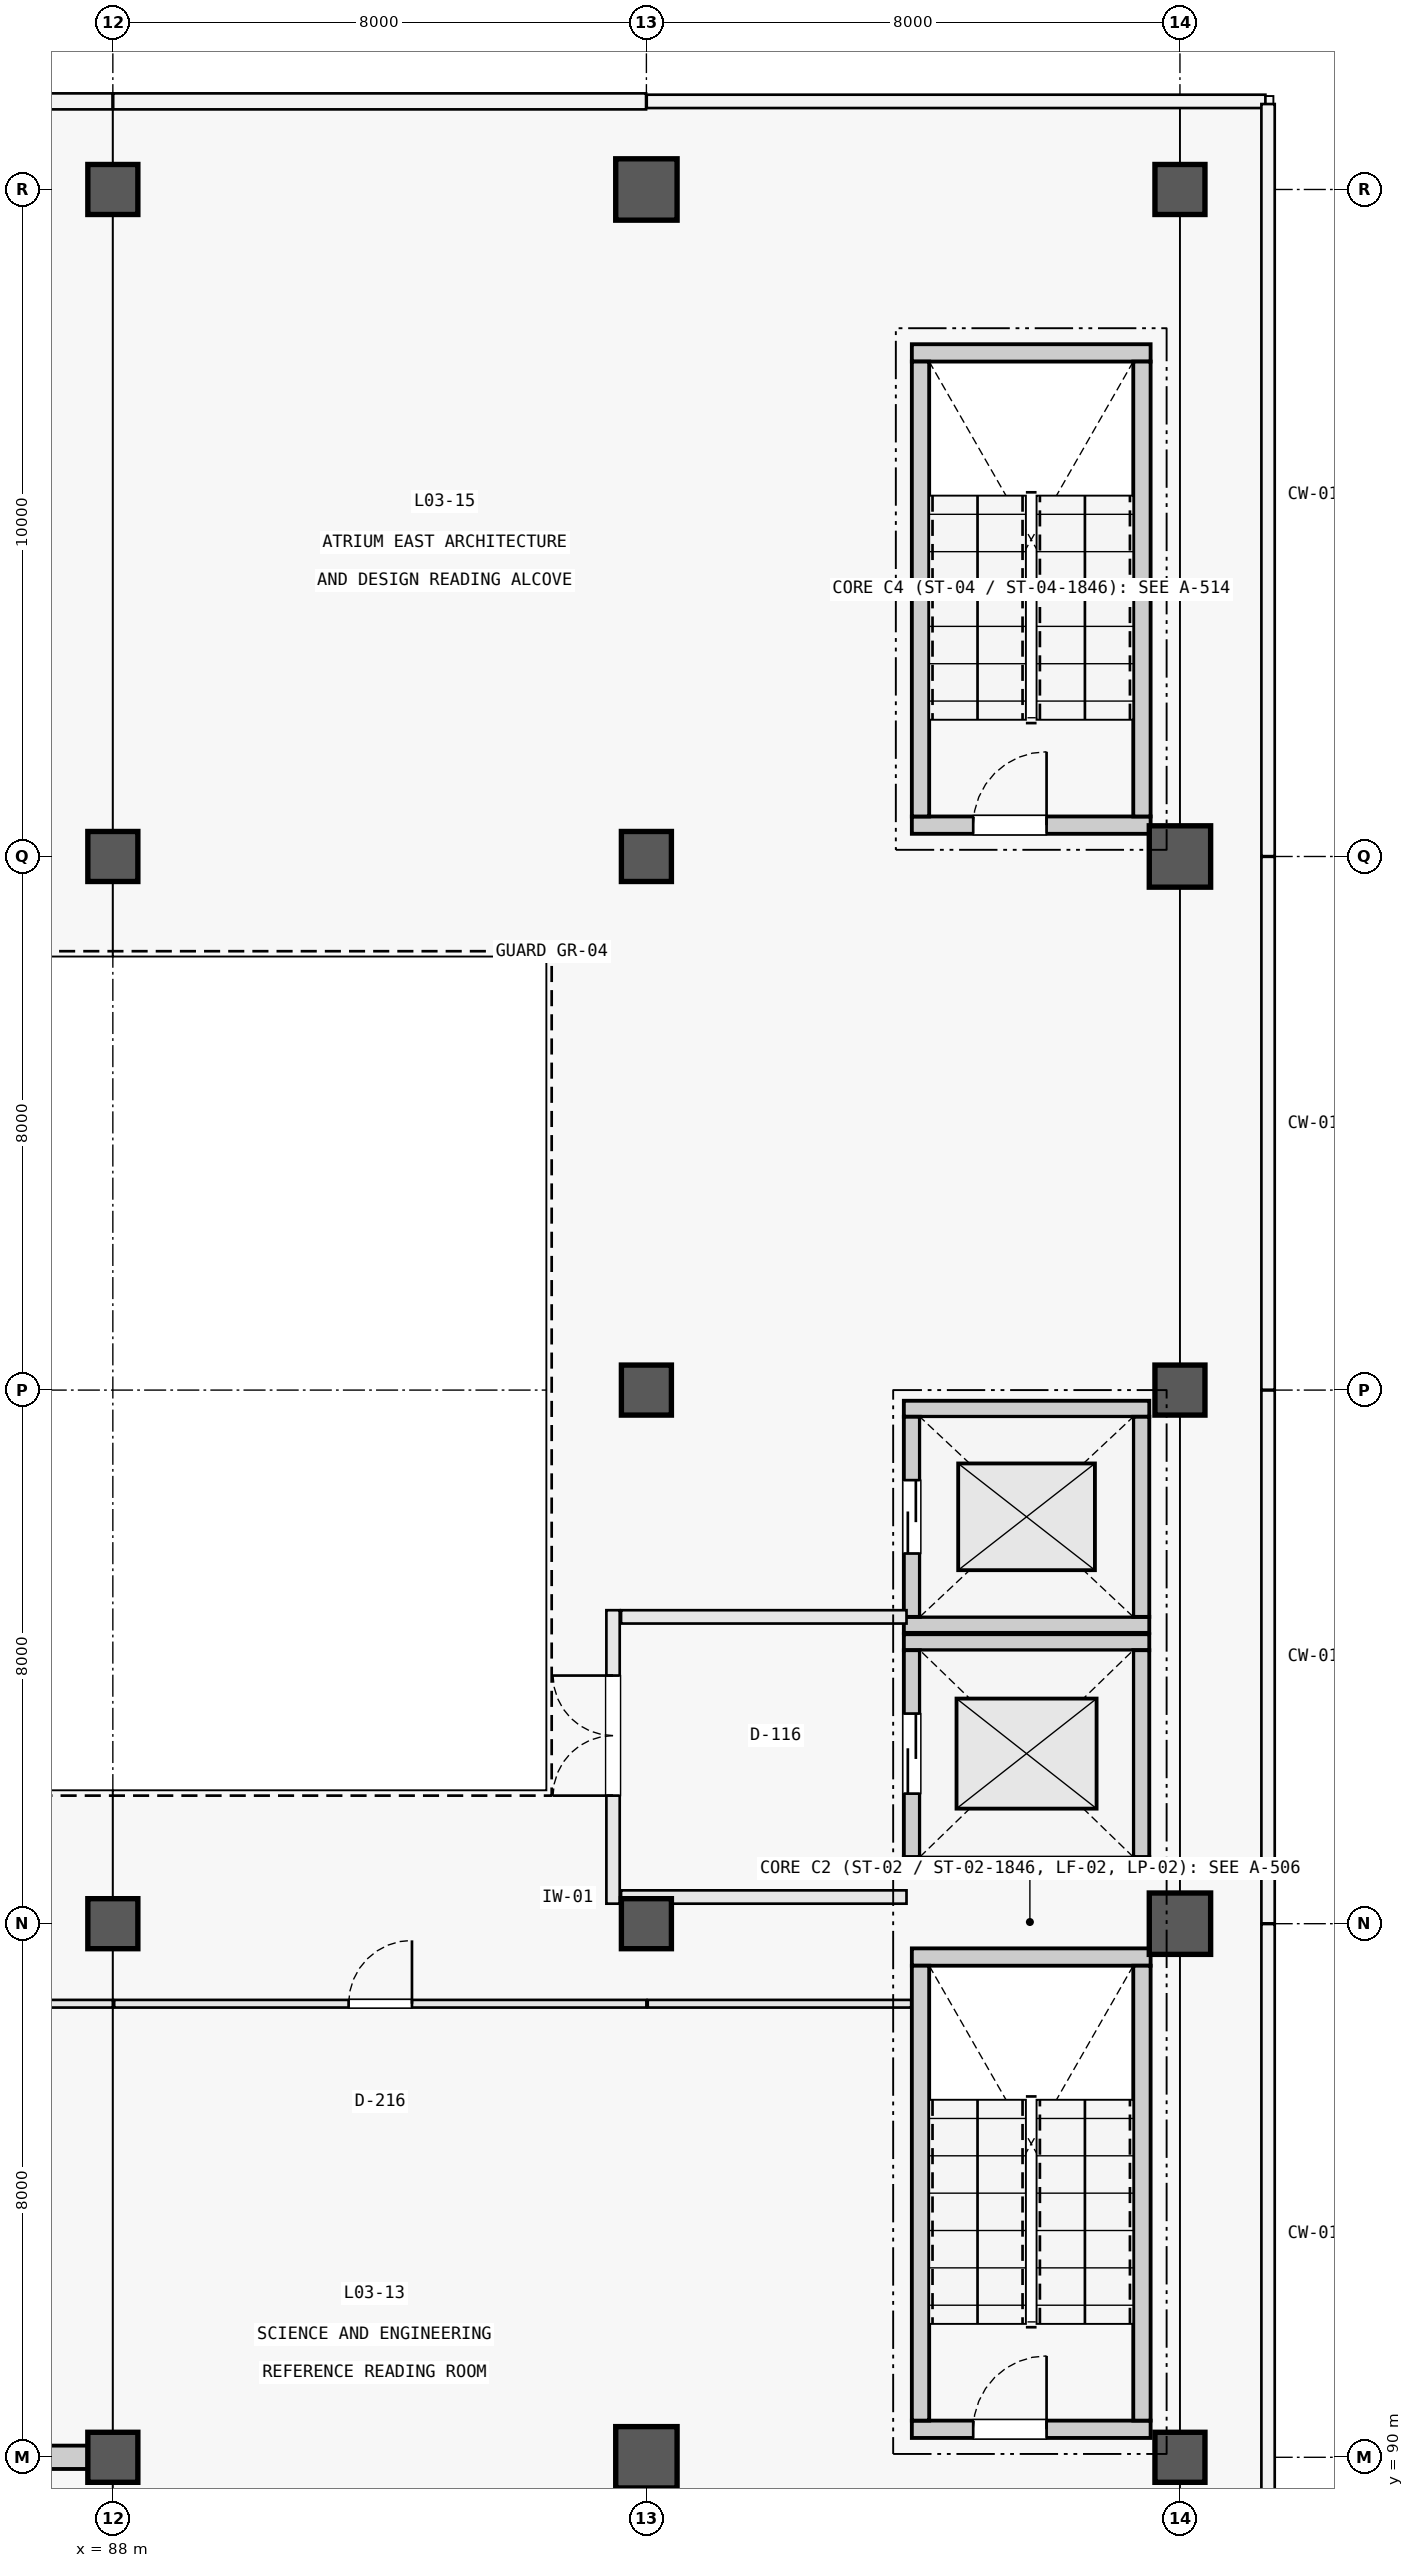
"""IFC4 building model, lengths in metres.
Left out: names, types, materials, properties, quantities, classifications, styles, units other than length and angle.
Written with IfcOpenShell. Run it as: python <this file> out.ifc"""

import sys

from ifc_helpers import new_model, si_unit, direction, frame, frame_2d, origin, origin_2d, place, context, subcontext, project, spatial, rectangle, extrude, element, fill, save


model = new_model("IFC4")
c1 = context("Model", 3, precision=1e-05, world=origin(), true_north=direction((0.0, 1.0)))
c2 = subcontext(c1, "Body", "Model", "MODEL_VIEW")
j1 = project(units=[si_unit("LENGTHUNIT", "METRE"), si_unit("PLANEANGLEUNIT", "RADIAN")], contexts=[c1])
p1 = place(None, origin())
s1 = spatial("IfcSite", under=j1, at=p1, CompositionType="ELEMENT")
p2 = place(p1, origin())
s2 = spatial("IfcBuilding", under=s1, at=p2, CompositionType="ELEMENT")
p3 = place(p2, frame((0.0, 0.0, 10.5)))
s3 = spatial("IfcBuildingStorey", under=s2, at=p3, CompositionType="ELEMENT", Elevation=10.5)
for number, where, z_axis, x_axis in (
    (1, (88.0, 90.0, 0.0), (0.0, 0.0, 1.0), (1.0, 0.0, 0.0)),
    (2, (88.0, 98.0, 0.0), (0.0, 0.0, 1.0), (1.0, 0.0, 0.0)),
    (3, (88.0, 114.0, 0.0), (0.0, 0.0, 1.0), (1.0, 0.0, 0.0)),
    (4, (88.0, 124.0, 0.0), (0.0, 0.0, 1.0), (1.0, 0.0, 0.0)),
):
    element("IfcColumn", number, at=place(p3, frame(where, z_axis=z_axis, x_axis=x_axis)), inside=s3, PredefinedType="COLUMN", context=c2, shape_type="SweptSolid", body=[
        extrude(rectangle(XDim=0.75, YDim=0.75, at=origin_2d()), origin(), (0.0, 0.0, 1.0), 4.8),
    ])
p4 = place(p3, frame((96.0, 90.0, 0.0), z_axis=(0.0, 0.0, 1.0), x_axis=(1.0, 0.0, 0.0)))
e5 = element("IfcColumn", 5, at=p4, inside=s3, PredefinedType="COLUMN", context=c2, shape_type="SweptSolid", body=[
    extrude(rectangle(XDim=0.92, YDim=0.92, at=origin_2d()), origin(), (0.0, 0.0, 1.0), 4.8),
])
for number, where, z_axis, x_axis in (
    (6, (96.0, 98.0, 0.0), (0.0, 0.0, 1.0), (1.0, 0.0, 0.0)),
    (7, (96.0, 106.0, 0.0), (0.0, 0.0, 1.0), (1.0, 0.0, 0.0)),
    (8, (96.0, 114.0, 0.0), (0.0, 0.0, 1.0), (1.0, 0.0, 0.0)),
):
    element("IfcColumn", number, at=place(p3, frame(where, z_axis=z_axis, x_axis=x_axis)), inside=s3, PredefinedType="COLUMN", context=c2, shape_type="SweptSolid", body=[
        extrude(rectangle(XDim=0.75, YDim=0.75, at=origin_2d()), origin(), (0.0, 0.0, 1.0), 4.8),
    ])
p5 = place(p3, frame((96.0, 124.0, 0.0), z_axis=(0.0, 0.0, 1.0), x_axis=(1.0, 0.0, 0.0)))
e9 = element("IfcColumn", 9, at=p5, inside=s3, PredefinedType="COLUMN", context=c2, shape_type="SweptSolid", body=[
    extrude(rectangle(XDim=0.92, YDim=0.92, at=origin_2d()), origin(), (0.0, 0.0, 1.0), 4.8),
])
p6 = place(p3, frame((104.0, 90.0, 0.0), z_axis=(0.0, 0.0, 1.0), x_axis=(1.0, 0.0, 0.0)))
e10 = element("IfcColumn", 10, at=p6, inside=s3, PredefinedType="COLUMN", context=c2, shape_type="SweptSolid", body=[
    extrude(rectangle(XDim=0.75, YDim=0.75, at=origin_2d()), origin(), (0.0, 0.0, 1.0), 4.8),
])
p7 = place(p3, frame((104.0, 98.0, 0.0), z_axis=(0.0, 0.0, 1.0), x_axis=(1.0, 0.0, 0.0)))
e11 = element("IfcColumn", 11, at=p7, inside=s3, PredefinedType="COLUMN", context=c2, shape_type="SweptSolid", body=[
    extrude(rectangle(XDim=0.92, YDim=0.92, at=origin_2d()), origin(), (0.0, 0.0, 1.0), 4.8),
])
p8 = place(p3, frame((104.0, 106.0, 0.0), z_axis=(0.0, 0.0, 1.0), x_axis=(1.0, 0.0, 0.0)))
e12 = element("IfcColumn", 12, at=p8, inside=s3, PredefinedType="COLUMN", context=c2, shape_type="SweptSolid", body=[
    extrude(rectangle(XDim=0.75, YDim=0.75, at=origin_2d()), origin(), (0.0, 0.0, 1.0), 4.8),
])
p9 = place(p3, frame((104.0, 114.0, 0.0), z_axis=(0.0, 0.0, 1.0), x_axis=(1.0, 0.0, 0.0)))
e13 = element("IfcColumn", 13, at=p9, inside=s3, PredefinedType="COLUMN", context=c2, shape_type="SweptSolid", body=[
    extrude(rectangle(XDim=0.92, YDim=0.92, at=origin_2d()), origin(), (0.0, 0.0, 1.0), 4.8),
])
p10 = place(p3, frame((104.0, 124.0, 0.0), z_axis=(0.0, 0.0, 1.0), x_axis=(1.0, 0.0, 0.0)))
e14 = element("IfcColumn", 14, at=p10, inside=s3, PredefinedType="COLUMN", context=c2, shape_type="SweptSolid", body=[
    extrude(rectangle(XDim=0.75, YDim=0.75, at=origin_2d()), origin(), (0.0, 0.0, 1.0), 4.8),
])
p11 = place(p3, frame((80.46, 90.0, 0.0), z_axis=(0.0, 0.0, 1.0), x_axis=(1.0, 0.0, 0.0)))
e15 = element("IfcWall", 15, at=p11, inside=s3, PredefinedType="SHEAR", context=c2, shape_type="SweptSolid", body=[
    extrude(rectangle(XDim=7.165, YDim=0.35, at=frame_2d((3.583, 0.0))), origin(), (0.0, 0.0, 1.0), 4.48),
])
p12 = place(p3, frame((99.98, 90.42, 0.0), z_axis=(0.0, 0.0, 1.0), x_axis=(1.0, 0.0, 0.0)))
e16 = element("IfcWall", 16, at=p12, inside=s3, PredefinedType="SOLIDWALL", context=c2, shape_type="SweptSolid", body=[
    extrude(rectangle(XDim=3.58, YDim=0.26, at=frame_2d((1.79, 0.0))), origin(), (0.0, 0.0, 1.0), 4.8),
])
p13 = place(p12, frame((0.92, 0.0, 0.0)))
e17 = element("IfcOpeningElement", 17, at=p13, cuts=e16, PredefinedType="OPENING", context=c2, shape_type="SweptSolid", body=[
    extrude(rectangle(XDim=1.1, YDim=2.2, at=frame_2d((0.55, 1.1))), frame((0.0, 0.142, 0.0), z_axis=(0.0, -1.0, 0.0), x_axis=(1.0, 0.0, 0.0)), (0.0, 0.0, 1.0), 0.284),
])
p14 = place(p3, frame((99.98, 97.5, 0.0), z_axis=(0.0, 0.0, 1.0), x_axis=(1.0, 0.0, 0.0)))
e18 = element("IfcWall", 18, at=p14, inside=s3, PredefinedType="SOLIDWALL", context=c2, shape_type="SweptSolid", body=[
    extrude(rectangle(XDim=3.58, YDim=0.26, at=frame_2d((1.79, 0.0))), origin(), (0.0, 0.0, 1.0), 4.8),
])
for number, where, z_axis, x_axis in (
    (19, (100.11, 90.55, 0.0), (0.0, 0.0, 1.0), (0.0, 1.0, 0.0)),
    (20, (103.43, 90.55, 0.0), (0.0, 0.0, 1.0), (0.0, 1.0, 0.0)),
):
    element("IfcWall", number, at=place(p3, frame(where, z_axis=z_axis, x_axis=x_axis)), inside=s3, PredefinedType="SOLIDWALL", context=c2, shape_type="SweptSolid", body=[
        extrude(rectangle(XDim=6.82, YDim=0.26, at=frame_2d((3.41, 0.0))), origin(), (0.0, 0.0, 1.0), 4.8),
    ])
p15 = place(p3, frame((99.98, 114.47, 0.0), z_axis=(0.0, 0.0, 1.0), x_axis=(1.0, 0.0, 0.0)))
e21 = element("IfcWall", 21, at=p15, inside=s3, PredefinedType="SOLIDWALL", context=c2, shape_type="SweptSolid", body=[
    extrude(rectangle(XDim=3.58, YDim=0.26, at=frame_2d((1.79, 0.0))), origin(), (0.0, 0.0, 1.0), 4.8),
])
p16 = place(p15, frame((0.92, 0.0, 0.0)))
e22 = element("IfcOpeningElement", 22, at=p16, cuts=e21, PredefinedType="OPENING", context=c2, shape_type="SweptSolid", body=[
    extrude(rectangle(XDim=1.1, YDim=2.2, at=frame_2d((0.55, 1.1))), frame((0.0, 0.142, 0.0), z_axis=(0.0, -1.0, 0.0), x_axis=(1.0, 0.0, 0.0)), (0.0, 0.0, 1.0), 0.284),
])
p17 = place(p3, frame((99.98, 121.55, 0.0), z_axis=(0.0, 0.0, 1.0), x_axis=(1.0, 0.0, 0.0)))
e23 = element("IfcWall", 23, at=p17, inside=s3, PredefinedType="SOLIDWALL", context=c2, shape_type="SweptSolid", body=[
    extrude(rectangle(XDim=3.58, YDim=0.26, at=frame_2d((1.79, 0.0))), origin(), (0.0, 0.0, 1.0), 4.8),
])
for number, where, z_axis, x_axis in (
    (24, (100.11, 114.6, 0.0), (0.0, 0.0, 1.0), (0.0, 1.0, 0.0)),
    (25, (103.43, 114.6, 0.0), (0.0, 0.0, 1.0), (0.0, 1.0, 0.0)),
):
    element("IfcWall", number, at=place(p3, frame(where, z_axis=z_axis, x_axis=x_axis)), inside=s3, PredefinedType="SOLIDWALL", context=c2, shape_type="SweptSolid", body=[
        extrude(rectangle(XDim=6.82, YDim=0.26, at=frame_2d((3.41, 0.0))), origin(), (0.0, 0.0, 1.0), 4.8),
    ])
for number, where, z_axis, x_axis in (
    (26, (99.86, 98.88, 0.0), (0.0, 0.0, 1.0), (1.0, 0.0, 0.0)),
    (27, (99.86, 102.22, 0.0), (0.0, 0.0, 1.0), (1.0, 0.0, 0.0)),
):
    element("IfcWall", number, at=place(p3, frame(where, z_axis=z_axis, x_axis=x_axis)), inside=s3, PredefinedType="SOLIDWALL", context=c2, shape_type="SweptSolid", body=[
        extrude(rectangle(XDim=3.68, YDim=0.24, at=frame_2d((1.84, 0.0))), origin(), (0.0, 0.0, 1.0), 4.8),
    ])
p18 = place(p3, frame((99.98, 99.0, 0.0), z_axis=(0.0, 0.0, 1.0), x_axis=(0.0, 1.0, 0.0)))
e28 = element("IfcWall", 28, at=p18, inside=s3, PredefinedType="SOLIDWALL", context=c2, shape_type="SweptSolid", body=[
    extrude(rectangle(XDim=3.1, YDim=0.24, at=frame_2d((1.55, 0.0))), origin(), (0.0, 0.0, 1.0), 4.8),
])
p19 = place(p18, frame((0.95, 0.0, 0.0)))
e29 = element("IfcOpeningElement", 29, at=p19, cuts=e28, PredefinedType="OPENING", context=c2, shape_type="SweptSolid", body=[
    extrude(rectangle(XDim=1.2, YDim=2.2, at=frame_2d((0.6, 1.1))), frame((0.0, 0.132, 0.0), z_axis=(0.0, -1.0, 0.0), x_axis=(1.0, 0.0, 0.0)), (0.0, 0.0, 1.0), 0.264),
])
p20 = place(p3, frame((103.42, 99.0, 0.0), z_axis=(0.0, 0.0, 1.0), x_axis=(0.0, 1.0, 0.0)))
e30 = element("IfcWall", 30, at=p20, inside=s3, PredefinedType="SOLIDWALL", context=c2, shape_type="SweptSolid", body=[
    extrude(rectangle(XDim=3.1, YDim=0.24, at=frame_2d((1.55, 0.0))), origin(), (0.0, 0.0, 1.0), 4.8),
])
for number, where, z_axis, x_axis in (
    (31, (99.86, 102.48, 0.0), (0.0, 0.0, 1.0), (1.0, 0.0, 0.0)),
    (32, (99.86, 105.72, 0.0), (0.0, 0.0, 1.0), (1.0, 0.0, 0.0)),
):
    element("IfcWall", number, at=place(p3, frame(where, z_axis=z_axis, x_axis=x_axis)), inside=s3, PredefinedType="SOLIDWALL", context=c2, shape_type="SweptSolid", body=[
        extrude(rectangle(XDim=3.68, YDim=0.24, at=frame_2d((1.84, 0.0))), origin(), (0.0, 0.0, 1.0), 4.8),
    ])
p21 = place(p3, frame((99.98, 102.6, 0.0), z_axis=(0.0, 0.0, 1.0), x_axis=(0.0, 1.0, 0.0)))
e33 = element("IfcWall", 33, at=p21, inside=s3, PredefinedType="SOLIDWALL", context=c2, shape_type="SweptSolid", body=[
    extrude(rectangle(XDim=3.0, YDim=0.24, at=frame_2d((1.5, 0.0))), origin(), (0.0, 0.0, 1.0), 4.8),
])
p22 = place(p21, frame((0.95, 0.0, 0.0)))
e34 = element("IfcOpeningElement", 34, at=p22, cuts=e33, PredefinedType="OPENING", context=c2, shape_type="SweptSolid", body=[
    extrude(rectangle(XDim=1.1, YDim=2.2, at=frame_2d((0.55, 1.1))), frame((0.0, 0.132, 0.0), z_axis=(0.0, -1.0, 0.0), x_axis=(1.0, 0.0, 0.0)), (0.0, 0.0, 1.0), 0.264),
])
p23 = place(p3, frame((103.42, 102.6, 0.0), z_axis=(0.0, 0.0, 1.0), x_axis=(0.0, 1.0, 0.0)))
e35 = element("IfcWall", 35, at=p23, inside=s3, PredefinedType="SOLIDWALL", context=c2, shape_type="SweptSolid", body=[
    extrude(rectangle(XDim=3.0, YDim=0.24, at=frame_2d((1.5, 0.0))), origin(), (0.0, 0.0, 1.0), 4.8),
])
for number, where, z_axis, x_axis in (
    (36, (95.62, 98.4, 0.0), (0.0, 0.0, 1.0), (1.0, 0.0, 0.0)),
    (37, (95.62, 102.6, 0.0), (0.0, 0.0, 1.0), (1.0, 0.0, 0.0)),
):
    element("IfcWall", number, at=place(p3, frame(where, z_axis=z_axis, x_axis=x_axis)), inside=s3, PredefinedType="PARTITIONING", context=c2, shape_type="SweptSolid", body=[
        extrude(rectangle(XDim=4.28, YDim=0.2, at=frame_2d((2.14, 0.0))), origin(), (0.0, 0.0, 1.0), 3.5),
    ])
p24 = place(p3, frame((95.5, 98.3, 0.0), z_axis=(0.0, 0.0, 1.0), x_axis=(0.0, 1.0, 0.0)))
e38 = element("IfcWall", 38, at=p24, inside=s3, PredefinedType="PARTITIONING", context=c2, shape_type="SweptSolid", body=[
    extrude(rectangle(XDim=4.4, YDim=0.2, at=frame_2d((2.2, 0.0))), origin(), (0.0, 0.0, 1.0), 3.5),
])
p25 = place(p24, frame((1.62, 0.0, 0.0)))
e39 = element("IfcOpeningElement", 39, at=p25, cuts=e38, PredefinedType="OPENING", context=c2, shape_type="SweptSolid", body=[
    extrude(rectangle(XDim=1.8, YDim=2.25, at=frame_2d((0.9, 1.125))), frame((0.0, 0.112, 0.0), z_axis=(0.0, -1.0, 0.0), x_axis=(1.0, 0.0, 0.0)), (0.0, 0.0, 1.0), 0.224),
])
p26 = place(p3, frame((80.02, 96.8, 0.0), z_axis=(0.0, 0.0, 1.0), x_axis=(1.0, 0.0, 0.0)))
e40 = element("IfcWall", 40, at=p26, inside=s3, PredefinedType="PARTITIONING", context=c2, shape_type="SweptSolid", body=[
    extrude(rectangle(XDim=7.98, YDim=0.115, at=frame_2d((3.99, 0.0))), origin(), (0.0, 0.0, 1.0), 3.33),
])
p27 = place(p26, frame((3.19, 0.0, 0.0)))
e41 = element("IfcOpeningElement", 41, at=p27, cuts=e40, PredefinedType="OPENING", context=c2, shape_type="SweptSolid", body=[
    extrude(rectangle(XDim=1.6, YDim=2.2, at=frame_2d((0.8, 1.1))), frame((0.0, 0.069, 0.0), z_axis=(0.0, -1.0, 0.0), x_axis=(1.0, 0.0, 0.0)), (0.0, 0.0, 1.0), 0.139),
])
p28 = place(p3, frame((88.02, 96.8, 0.0), z_axis=(0.0, 0.0, 1.0), x_axis=(1.0, 0.0, 0.0)))
e42 = element("IfcWall", 42, at=p28, inside=s3, PredefinedType="PARTITIONING", context=c2, shape_type="SweptSolid", body=[
    extrude(rectangle(XDim=7.98, YDim=0.115, at=frame_2d((3.99, 0.0))), origin(), (0.0, 0.0, 1.0), 3.33),
])
p29 = place(p28, frame((3.515, 0.0, 0.0)))
e43 = element("IfcOpeningElement", 43, at=p29, cuts=e42, PredefinedType="OPENING", context=c2, shape_type="SweptSolid", body=[
    extrude(rectangle(XDim=0.95, YDim=2.15, at=frame_2d((0.475, 1.075))), frame((0.0, 0.069, 0.0), z_axis=(0.0, -1.0, 0.0), x_axis=(1.0, 0.0, 0.0)), (0.0, 0.0, 1.0), 0.139),
])
p30 = place(p3, frame((96.02, 96.8, 0.0), z_axis=(0.0, 0.0, 1.0), x_axis=(1.0, 0.0, 0.0)))
e44 = element("IfcWall", 44, at=p30, inside=s3, PredefinedType="PARTITIONING", context=c2, shape_type="SweptSolid", body=[
    extrude(rectangle(XDim=3.95, YDim=0.115, at=frame_2d((1.975, 0.0))), origin(), (0.0, 0.0, 1.0), 3.33),
])
p31 = place(p13, origin())
e45 = element("IfcDoor", 45, at=p31, inside=s3, OperationType="SINGLE_SWING_RIGHT", PredefinedType="DOOR", context=c2, shape_type="SweptSolid", body=[
    extrude(rectangle(XDim=1.1, YDim=2.2, at=frame_2d((0.55, 1.1))), frame((0.0, 0.025, 0.0), z_axis=(0.0, -1.0, 0.0), x_axis=(1.0, 0.0, 0.0)), (0.0, 0.0, 1.0), 0.05),
])
fill(e17, e45)
p32 = place(p16, origin())
e46 = element("IfcDoor", 46, at=p32, inside=s3, OperationType="SINGLE_SWING_RIGHT", PredefinedType="DOOR", context=c2, shape_type="SweptSolid", body=[
    extrude(rectangle(XDim=1.1, YDim=2.2, at=frame_2d((0.55, 1.1))), frame((0.0, 0.025, 0.0), z_axis=(0.0, -1.0, 0.0), x_axis=(1.0, 0.0, 0.0)), (0.0, 0.0, 1.0), 0.05),
])
fill(e22, e46)
p33 = place(p19, origin())
e47 = element("IfcDoor", 47, at=p33, inside=s3, OperationType="DOUBLE_DOOR_SLIDING", PredefinedType="DOOR", context=c2, shape_type="SweptSolid", body=[
    extrude(rectangle(XDim=1.2, YDim=2.2, at=frame_2d((0.6, 1.1))), frame((0.0, 0.025, 0.0), z_axis=(0.0, -1.0, 0.0), x_axis=(1.0, 0.0, 0.0)), (0.0, 0.0, 1.0), 0.05),
])
fill(e29, e47)
p34 = place(p22, origin())
e48 = element("IfcDoor", 48, at=p34, inside=s3, OperationType="DOUBLE_DOOR_SLIDING", PredefinedType="DOOR", context=c2, shape_type="SweptSolid", body=[
    extrude(rectangle(XDim=1.1, YDim=2.2, at=frame_2d((0.55, 1.1))), frame((0.0, 0.025, 0.0), z_axis=(0.0, -1.0, 0.0), x_axis=(1.0, 0.0, 0.0)), (0.0, 0.0, 1.0), 0.05),
])
fill(e34, e48)
p35 = place(p25, origin())
e49 = element("IfcDoor", 49, at=p35, inside=s3, OperationType="DOUBLE_DOOR_SINGLE_SWING", PredefinedType="DOOR", context=c2, shape_type="SweptSolid", body=[
    extrude(rectangle(XDim=1.8, YDim=2.25, at=frame_2d((0.9, 1.125))), frame((0.0, 0.025, 0.0), z_axis=(0.0, -1.0, 0.0), x_axis=(1.0, 0.0, 0.0)), (0.0, 0.0, 1.0), 0.05),
])
fill(e39, e49)
p36 = place(p29, origin())
e50 = element("IfcDoor", 50, at=p36, inside=s3, OperationType="SINGLE_SWING_RIGHT", PredefinedType="DOOR", context=c2, shape_type="SweptSolid", body=[
    extrude(rectangle(XDim=0.95, YDim=2.15, at=frame_2d((0.475, 1.075))), frame((0.0, 0.025, 0.0), z_axis=(0.0, -1.0, 0.0), x_axis=(1.0, 0.0, 0.0)), (0.0, 0.0, 1.0), 0.05),
])
fill(e43, e50)
save(model, sys.argv[1])
